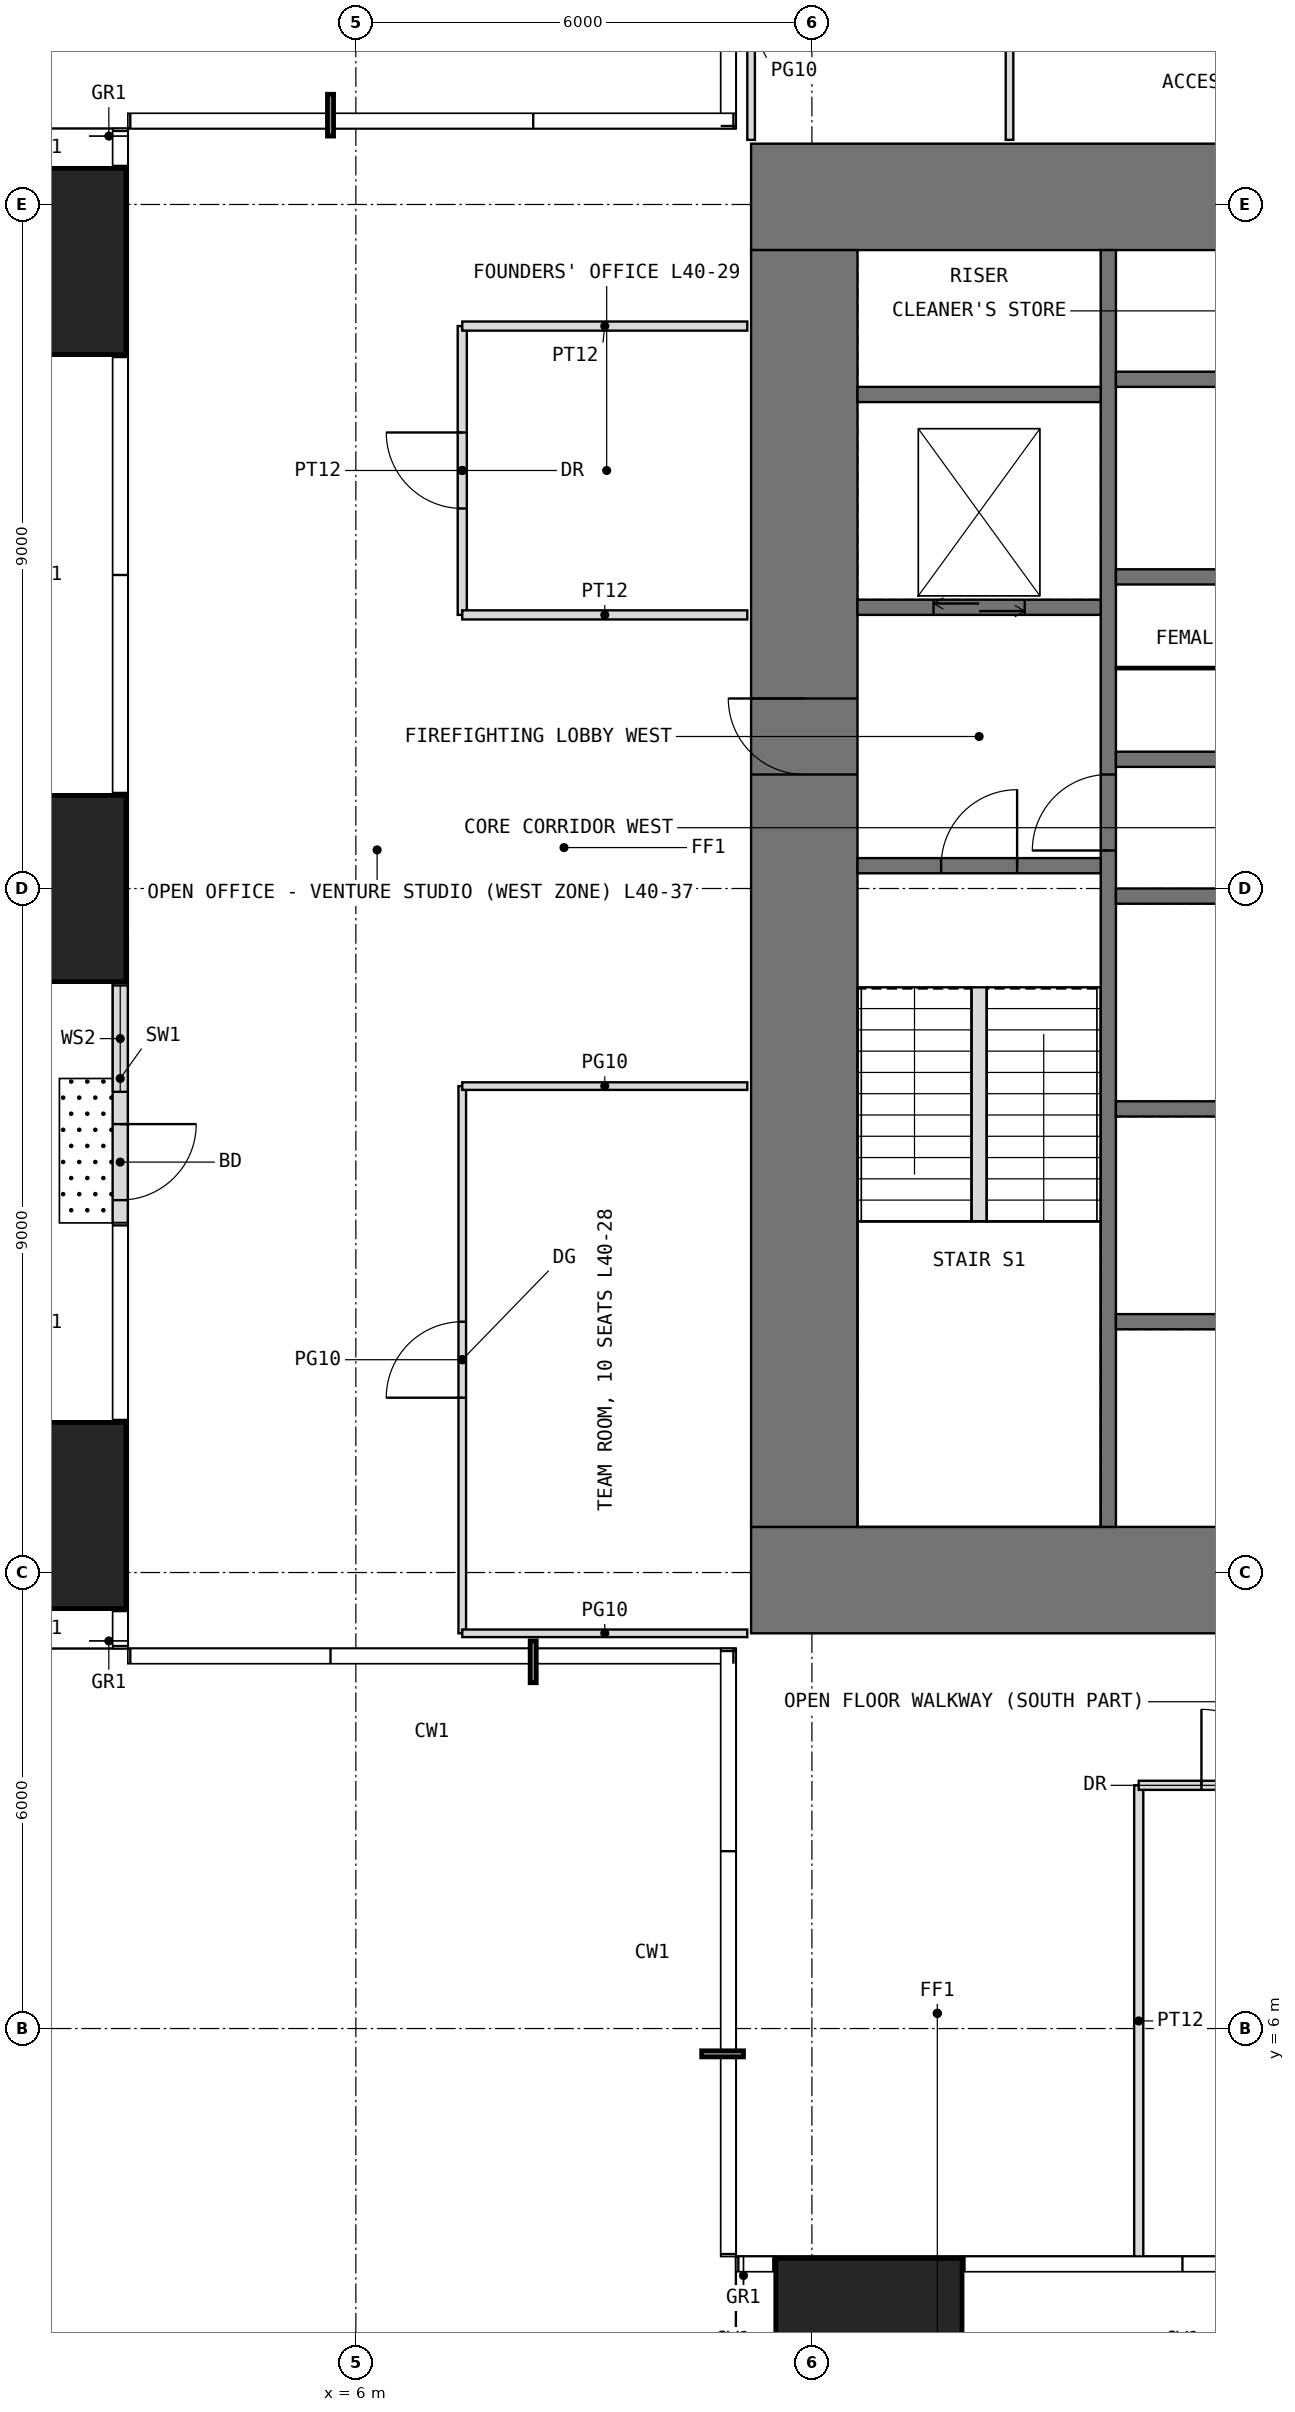
"""IFC4 building model, lengths in metres.
Left out: names, types, materials, properties, quantities, classifications, styles, units other than length and angle.
Written with IfcOpenShell. Run it as: python <this file> out.ifc"""

import sys

from ifc_helpers import new_model, si_unit, direction, frame, frame_2d, origin, origin_2d, place, context, subcontext, project, spatial, rectangle, extrude, element, fill, save


model = new_model("IFC4")
c1 = context("Model", 3, precision=1e-05, world=origin(), true_north=direction((0.0, 1.0)))
c2 = subcontext(c1, "Body", "Model", "MODEL_VIEW")
j1 = project(units=[si_unit("LENGTHUNIT", "METRE"), si_unit("PLANEANGLEUNIT", "RADIAN")], contexts=[c1])
p1 = place(None, origin())
s1 = spatial("IfcSite", under=j1, at=p1, CompositionType="ELEMENT")
p2 = place(p1, origin())
s2 = spatial("IfcBuilding", under=s1, at=p2, CompositionType="ELEMENT")
p3 = place(p2, frame((0.0, 0.0, 170.5)))
s3 = spatial("IfcBuildingStorey", under=s2, at=p3, CompositionType="ELEMENT", Elevation=170.5)
for number, where, z_axis, x_axis in (
    (1, (12.75, 1.75, 0.0), (0.0, 0.0, 1.0), (1.0, 0.0, 0.0)),
    (2, (1.75, 12.75, 0.0), (0.0, 0.0, 1.0), (1.0, 0.0, 0.0)),
    (3, (1.75, 21.0, 0.0), (0.0, 0.0, 1.0), (1.0, 0.0, 0.0)),
    (4, (1.75, 29.25, 0.0), (0.0, 0.0, 1.0), (1.0, 0.0, 0.0)),
):
    element("IfcColumn", number, at=place(p3, frame(where, z_axis=z_axis, x_axis=x_axis)), inside=s3, PredefinedType="COLUMN", context=c2, shape_type="SweptSolid", body=[
        extrude(rectangle(XDim=2.45, YDim=2.45, at=origin_2d()), origin(), (0.0, 0.0, 1.0), 4.0),
    ])
p4 = place(p3, frame((2.9, 20.4, 0.0), z_axis=(0.0, 0.0, 1.0), x_axis=(0.0, -1.0, 0.0)))
e5 = element("IfcWall", 5, at=p4, inside=s3, PredefinedType="USERDEFINED", context=c2, shape_type="SweptSolid", body=[
    extrude(rectangle(XDim=3.8, YDim=0.2, at=frame_2d((1.9, 0.0))), origin(), (0.0, 0.0, 1.0), 3.75),
])
p5 = place(p4, frame((2.5, 0.0, 0.0)))
e6 = element("IfcOpeningElement", 6, at=p5, cuts=e5, PredefinedType="OPENING", context=c2, shape_type="SweptSolid", body=[
    extrude(rectangle(XDim=1.0, YDim=2.4, at=frame_2d((0.5, 1.2))), frame((0.0, 0.11, 0.0), z_axis=(0.0, -1.0, 0.0), x_axis=(1.0, 0.0, 0.0)), (0.0, 0.0, 1.0), 0.22),
])
p6 = place(p4, frame((0.675, 0.0, 0.3)))
e7 = element("IfcOpeningElement", 7, at=p6, cuts=e5, PredefinedType="OPENING", context=c2, shape_type="SweptSolid", body=[
    extrude(rectangle(XDim=1.4, YDim=2.7, at=frame_2d((0.7, 1.35))), frame((0.0, 0.11, 0.0), z_axis=(0.0, -1.0, 0.0), x_axis=(1.0, 0.0, 0.0)), (0.0, 0.0, 1.0), 0.22),
])
p7 = place(p3, frame((11.2, 11.9, -0.05), z_axis=(0.0, 0.0, 1.0), x_axis=(1.0, 0.0, 0.0)))
e8 = element("IfcWall", 8, at=p7, inside=s3, PredefinedType="SHEAR", context=c2, shape_type="SweptSolid", body=[
    extrude(rectangle(XDim=19.6, YDim=1.4, at=frame_2d((9.8, 0.0))), origin(), (0.0, 0.0, 1.0), 4.0),
])
p8 = place(p7, frame((8.8, 0.0, 0.05)))
e9 = element("IfcOpeningElement", 9, at=p8, cuts=e8, PredefinedType="OPENING", context=c2, shape_type="SweptSolid", body=[
    extrude(rectangle(XDim=2.0, YDim=2.2, at=frame_2d((1.0, 1.1))), frame((0.0, 0.71, 0.0), z_axis=(0.0, -1.0, 0.0), x_axis=(1.0, 0.0, 0.0)), (0.0, 0.0, 1.0), 1.42),
])
p9 = place(p3, frame((11.2, 30.1, -0.05), z_axis=(0.0, 0.0, 1.0), x_axis=(1.0, 0.0, 0.0)))
e10 = element("IfcWall", 10, at=p9, inside=s3, PredefinedType="SHEAR", context=c2, shape_type="SweptSolid", body=[
    extrude(rectangle(XDim=19.6, YDim=1.4, at=frame_2d((9.8, 0.0))), origin(), (0.0, 0.0, 1.0), 4.0),
])
p10 = place(p9, frame((8.8, 0.0, 0.05)))
e11 = element("IfcOpeningElement", 11, at=p10, cuts=e10, PredefinedType="OPENING", context=c2, shape_type="SweptSolid", body=[
    extrude(rectangle(XDim=2.0, YDim=2.2, at=frame_2d((1.0, 1.1))), frame((0.0, 0.71, 0.0), z_axis=(0.0, -1.0, 0.0), x_axis=(1.0, 0.0, 0.0)), (0.0, 0.0, 1.0), 1.42),
])
p11 = place(p3, frame((11.9, 12.6, -0.05), z_axis=(0.0, 0.0, 1.0), x_axis=(0.0, 1.0, 0.0)))
e12 = element("IfcWall", 12, at=p11, inside=s3, PredefinedType="SHEAR", context=c2, shape_type="SweptSolid", body=[
    extrude(rectangle(XDim=16.8, YDim=1.4, at=frame_2d((8.4, 0.0))), origin(), (0.0, 0.0, 1.0), 4.0),
])
p12 = place(p11, frame((9.9, 0.0, 0.05)))
e13 = element("IfcOpeningElement", 13, at=p12, cuts=e12, PredefinedType="OPENING", context=c2, shape_type="SweptSolid", body=[
    extrude(rectangle(XDim=1.0, YDim=2.2, at=frame_2d((0.5, 1.1))), frame((0.0, 0.71, 0.0), z_axis=(0.0, -1.0, 0.0), x_axis=(1.0, 0.0, 0.0)), (0.0, 0.0, 1.0), 1.42),
])
p13 = place(p3, frame((15.9, 12.6, -0.05), z_axis=(0.0, 0.0, 1.0), x_axis=(0.0, 1.0, 0.0)))
e14 = element("IfcWall", 14, at=p13, inside=s3, PredefinedType="SHEAR", context=c2, shape_type="SweptSolid", body=[
    extrude(rectangle(XDim=16.8, YDim=0.2, at=frame_2d((8.4, 0.0))), origin(), (0.0, 0.0, 1.0), 4.0),
])
p14 = place(p13, frame((8.9, 0.0, 0.05)))
e15 = element("IfcOpeningElement", 15, at=p14, cuts=e14, PredefinedType="OPENING", context=c2, shape_type="SweptSolid", body=[
    extrude(rectangle(XDim=1.0, YDim=2.2, at=frame_2d((0.5, 1.1))), frame((0.0, 0.11, 0.0), z_axis=(0.0, -1.0, 0.0), x_axis=(1.0, 0.0, 0.0)), (0.0, 0.0, 1.0), 0.22),
])
p15 = place(p3, frame((12.6, 21.3, -0.05), z_axis=(0.0, 0.0, 1.0), x_axis=(1.0, 0.0, 0.0)))
e16 = element("IfcWall", 16, at=p15, inside=s3, PredefinedType="SHEAR", context=c2, shape_type="SweptSolid", body=[
    extrude(rectangle(XDim=3.2, YDim=0.2, at=frame_2d((1.6, 0.0))), origin(), (0.0, 0.0, 1.0), 4.0),
])
p16 = place(p15, frame((1.1, 0.0, 0.05)))
e17 = element("IfcOpeningElement", 17, at=p16, cuts=e16, PredefinedType="OPENING", context=c2, shape_type="SweptSolid", body=[
    extrude(rectangle(XDim=1.0, YDim=2.2, at=frame_2d((0.5, 1.1))), frame((0.0, 0.11, 0.0), z_axis=(0.0, -1.0, 0.0), x_axis=(1.0, 0.0, 0.0)), (0.0, 0.0, 1.0), 0.22),
])
p17 = place(p3, frame((12.6, 24.7, -0.05), z_axis=(0.0, 0.0, 1.0), x_axis=(1.0, 0.0, 0.0)))
e18 = element("IfcWall", 18, at=p17, inside=s3, PredefinedType="SHEAR", context=c2, shape_type="SweptSolid", body=[
    extrude(rectangle(XDim=3.2, YDim=0.2, at=frame_2d((1.6, 0.0))), origin(), (0.0, 0.0, 1.0), 4.0),
])
p18 = place(p17, frame((1.0, 0.0, 0.05)))
e19 = element("IfcOpeningElement", 19, at=p18, cuts=e18, PredefinedType="OPENING", context=c2, shape_type="SweptSolid", body=[
    extrude(rectangle(XDim=1.2, YDim=2.2, at=frame_2d((0.6, 1.1))), frame((0.0, 0.11, 0.0), z_axis=(0.0, -1.0, 0.0), x_axis=(1.0, 0.0, 0.0)), (0.0, 0.0, 1.0), 0.22),
])
for number, where, z_axis, x_axis in (
    (20, (12.6, 27.5, -0.05), (0.0, 0.0, 1.0), (1.0, 0.0, 0.0)),
    (21, (16.0, 15.3, -0.05), (0.0, 0.0, 1.0), (1.0, 0.0, 0.0)),
    (22, (16.0, 18.1, -0.05), (0.0, 0.0, 1.0), (1.0, 0.0, 0.0)),
    (23, (16.0, 20.9, -0.05), (0.0, 0.0, 1.0), (1.0, 0.0, 0.0)),
    (24, (16.0, 22.7, -0.05), (0.0, 0.0, 1.0), (1.0, 0.0, 0.0)),
    (25, (16.0, 25.1, -0.05), (0.0, 0.0, 1.0), (1.0, 0.0, 0.0)),
    (26, (16.0, 27.7, -0.05), (0.0, 0.0, 1.0), (1.0, 0.0, 0.0)),
):
    element("IfcWall", number, at=place(p3, frame(where, z_axis=z_axis, x_axis=x_axis)), inside=s3, PredefinedType="SHEAR", context=c2, shape_type="SweptSolid", body=[
        extrude(rectangle(XDim=3.2, YDim=0.2, at=frame_2d((1.6, 0.0))), origin(), (0.0, 0.0, 1.0), 4.0),
    ])
p19 = place(p3, frame((16.0, 23.9, 0.0), z_axis=(0.0, 0.0, 1.0), x_axis=(1.0, 0.0, 0.0)))
e27 = element("IfcWall", 27, at=p19, inside=s3, PredefinedType="PARTITIONING", context=c2, shape_type="SweptSolid", body=[
    extrude(rectangle(XDim=1.4, YDim=0.03, at=frame_2d((0.7, 0.0))), origin(), (0.0, 0.0, 1.0), 3.75),
])
p20 = place(p3, frame((7.4, 11.2, 0.0), z_axis=(0.0, 0.0, 1.0), x_axis=(0.0, 1.0, 0.0)))
e28 = element("IfcWall", 28, at=p20, inside=s3, PredefinedType="PARTITIONING", context=c2, shape_type="SweptSolid", body=[
    extrude(rectangle(XDim=7.2, YDim=0.1, at=frame_2d((3.6, 0.0))), origin(), (0.0, 0.0, 1.0), 3.75),
])
p21 = place(p20, frame((3.1, 0.0, 0.0)))
e29 = element("IfcOpeningElement", 29, at=p21, cuts=e28, PredefinedType="OPENING", context=c2, shape_type="SweptSolid", body=[
    extrude(rectangle(XDim=1.0, YDim=2.4, at=frame_2d((0.5, 1.2))), frame((0.0, 0.06, 0.0), z_axis=(0.0, -1.0, 0.0), x_axis=(1.0, 0.0, 0.0)), (0.0, 0.0, 1.0), 0.12),
])
for number, where, z_axis, x_axis in (
    (30, (7.4, 11.2, 0.0), (0.0, 0.0, 1.0), (1.0, 0.0, 0.0)),
    (31, (7.4, 18.4, 0.0), (0.0, 0.0, 1.0), (1.0, 0.0, 0.0)),
):
    element("IfcWall", number, at=place(p3, frame(where, z_axis=z_axis, x_axis=x_axis)), inside=s3, PredefinedType="PARTITIONING", context=c2, shape_type="SweptSolid", body=[
        extrude(rectangle(XDim=3.75, YDim=0.1, at=frame_2d((1.875, 0.0))), origin(), (0.0, 0.0, 1.0), 3.75),
    ])
p22 = place(p3, frame((7.4, 24.6, 0.0), z_axis=(0.0, 0.0, 1.0), x_axis=(0.0, 1.0, 0.0)))
e32 = element("IfcWall", 32, at=p22, inside=s3, PredefinedType="PARTITIONING", context=c2, shape_type="SweptSolid", body=[
    extrude(rectangle(XDim=3.8, YDim=0.12, at=frame_2d((1.9, 0.0))), origin(), (0.0, 0.0, 1.0), 3.75),
])
p23 = place(p22, frame((1.4, 0.0, 0.0)))
e33 = element("IfcOpeningElement", 33, at=p23, cuts=e32, PredefinedType="OPENING", context=c2, shape_type="SweptSolid", body=[
    extrude(rectangle(XDim=1.0, YDim=2.2, at=frame_2d((0.5, 1.1))), frame((0.0, 0.07, 0.0), z_axis=(0.0, -1.0, 0.0), x_axis=(1.0, 0.0, 0.0)), (0.0, 0.0, 1.0), 0.14),
])
for number, where, z_axis, x_axis in (
    (34, (7.4, 24.6, 0.0), (0.0, 0.0, 1.0), (1.0, 0.0, 0.0)),
    (35, (7.4, 28.4, 0.0), (0.0, 0.0, 1.0), (1.0, 0.0, 0.0)),
):
    element("IfcWall", number, at=place(p3, frame(where, z_axis=z_axis, x_axis=x_axis)), inside=s3, PredefinedType="PARTITIONING", context=c2, shape_type="SweptSolid", body=[
        extrude(rectangle(XDim=3.75, YDim=0.12, at=frame_2d((1.875, 0.0))), origin(), (0.0, 0.0, 1.0), 3.75),
    ])
for number, where, z_axis, x_axis in (
    (36, (11.2, 30.85, 0.0), (0.0, 0.0, 1.0), (0.0, 1.0, 0.0)),
    (37, (14.6, 30.85, 0.0), (0.0, 0.0, 1.0), (0.0, 1.0, 0.0)),
):
    element("IfcWall", number, at=place(p3, frame(where, z_axis=z_axis, x_axis=x_axis)), inside=s3, PredefinedType="PARTITIONING", context=c2, shape_type="SweptSolid", body=[
        extrude(rectangle(XDim=2.95, YDim=0.1, at=frame_2d((1.475, 0.0))), origin(), (0.0, 0.0, 1.0), 3.75),
    ])
p24 = place(p3, frame((16.3, 3.0, 0.0), z_axis=(0.0, 0.0, 1.0), x_axis=(0.0, 1.0, 0.0)))
e38 = element("IfcWall", 38, at=p24, inside=s3, PredefinedType="PARTITIONING", context=c2, shape_type="SweptSolid", body=[
    extrude(rectangle(XDim=6.2, YDim=0.12, at=frame_2d((3.1, 0.0))), origin(), (0.0, 0.0, 1.0), 3.75),
])
p25 = place(p3, frame((16.3, 9.2, 0.0), z_axis=(0.0, 0.0, 1.0), x_axis=(1.0, 0.0, 0.0)))
e39 = element("IfcWall", 39, at=p25, inside=s3, PredefinedType="PARTITIONING", context=c2, shape_type="SweptSolid", body=[
    extrude(rectangle(XDim=2.65, YDim=0.12, at=frame_2d((1.325, 0.0))), origin(), (0.0, 0.0, 1.0), 3.75),
])
p26 = place(p25, frame((0.825, 0.0, 0.0)))
e40 = element("IfcOpeningElement", 40, at=p26, cuts=e39, PredefinedType="OPENING", context=c2, shape_type="SweptSolid", body=[
    extrude(rectangle(XDim=1.0, YDim=2.2, at=frame_2d((0.5, 1.1))), frame((0.0, 0.07, 0.0), z_axis=(0.0, -1.0, 0.0), x_axis=(1.0, 0.0, 0.0)), (0.0, 0.0, 1.0), 0.14),
])
p27 = place(p3, frame((14.2, 16.62, 0.0), z_axis=(0.0, 0.0, 1.0), x_axis=(0.0, 1.0, 0.0)))
e41 = element("IfcWall", 41, at=p27, inside=s3, PredefinedType="PARTITIONING", context=c2, shape_type="SweptSolid", body=[
    extrude(rectangle(XDim=3.08, YDim=0.2, at=frame_2d((1.54, 0.0))), origin(), (0.0, 0.0, 1.0), 4.0),
])
p28 = place(p5, origin())
e42 = element("IfcDoor", 42, at=p28, inside=s3, OperationType="SINGLE_SWING_LEFT", PredefinedType="DOOR", context=c2, shape_type="SweptSolid", body=[
    extrude(rectangle(XDim=1.0, YDim=2.4, at=frame_2d((0.5, 1.2))), frame((0.0, 0.025, 0.0), z_axis=(0.0, -1.0, 0.0), x_axis=(1.0, 0.0, 0.0)), (0.0, 0.0, 1.0), 0.05),
])
fill(e6, e42)
p29 = place(p6, origin())
e43 = element("IfcWindow", 43, at=p29, inside=s3, PartitioningType="SINGLE_PANEL", PredefinedType="WINDOW", context=c2, shape_type="SweptSolid", body=[
    extrude(rectangle(XDim=1.4, YDim=2.7, at=frame_2d((0.7, 1.35))), frame((0.0, 0.03, 0.0), z_axis=(0.0, -1.0, 0.0), x_axis=(1.0, 0.0, 0.0)), (0.0, 0.0, 1.0), 0.06),
])
fill(e7, e43)
p30 = place(p12, origin())
e44 = element("IfcDoor", 44, at=p30, inside=s3, OperationType="SINGLE_SWING_RIGHT", PredefinedType="DOOR", context=c2, shape_type="SweptSolid", body=[
    extrude(rectangle(XDim=1.0, YDim=2.2, at=frame_2d((0.5, 1.1))), frame((0.0, 0.025, 0.0), z_axis=(0.0, -1.0, 0.0), x_axis=(1.0, 0.0, 0.0)), (0.0, 0.0, 1.0), 0.05),
])
fill(e13, e44)
p31 = place(p16, origin())
e45 = element("IfcDoor", 45, at=p31, inside=s3, OperationType="SINGLE_SWING_RIGHT", PredefinedType="DOOR", context=c2, shape_type="SweptSolid", body=[
    extrude(rectangle(XDim=1.0, YDim=2.2, at=frame_2d((0.5, 1.1))), frame((0.0, 0.025, 0.0), z_axis=(0.0, -1.0, 0.0), x_axis=(1.0, 0.0, 0.0)), (0.0, 0.0, 1.0), 0.05),
])
fill(e17, e45)
p32 = place(p14, origin())
e46 = element("IfcDoor", 46, at=p32, inside=s3, OperationType="SINGLE_SWING_LEFT", PredefinedType="DOOR", context=c2, shape_type="SweptSolid", body=[
    extrude(rectangle(XDim=1.0, YDim=2.2, at=frame_2d((0.5, 1.1))), frame((0.0, 0.025, 0.0), z_axis=(0.0, -1.0, 0.0), x_axis=(1.0, 0.0, 0.0)), (0.0, 0.0, 1.0), 0.05),
])
fill(e15, e46)
p33 = place(p26, origin())
e47 = element("IfcDoor", 47, at=p33, inside=s3, OperationType="SINGLE_SWING_LEFT", PredefinedType="DOOR", context=c2, shape_type="SweptSolid", body=[
    extrude(rectangle(XDim=1.0, YDim=2.2, at=frame_2d((0.5, 1.1))), frame((0.0, 0.025, 0.0), z_axis=(0.0, -1.0, 0.0), x_axis=(1.0, 0.0, 0.0)), (0.0, 0.0, 1.0), 0.05),
])
fill(e40, e47)
p34 = place(p21, origin())
e48 = element("IfcDoor", 48, at=p34, inside=s3, OperationType="SINGLE_SWING_LEFT", PredefinedType="DOOR", context=c2, shape_type="SweptSolid", body=[
    extrude(rectangle(XDim=1.0, YDim=2.4, at=frame_2d((0.5, 1.2))), frame((0.0, 0.025, 0.0), z_axis=(0.0, -1.0, 0.0), x_axis=(1.0, 0.0, 0.0)), (0.0, 0.0, 1.0), 0.05),
])
fill(e29, e48)
p35 = place(p23, origin())
e49 = element("IfcDoor", 49, at=p35, inside=s3, OperationType="SINGLE_SWING_RIGHT", PredefinedType="DOOR", context=c2, shape_type="SweptSolid", body=[
    extrude(rectangle(XDim=1.0, YDim=2.2, at=frame_2d((0.5, 1.1))), frame((0.0, 0.025, 0.0), z_axis=(0.0, -1.0, 0.0), x_axis=(1.0, 0.0, 0.0)), (0.0, 0.0, 1.0), 0.05),
])
fill(e33, e49)
p36 = place(p18, origin())
e50 = element("IfcDoor", 50, at=p36, inside=s3, OperationType="DOUBLE_DOOR_SLIDING", PredefinedType="DOOR", context=c2, shape_type="SweptSolid", body=[
    extrude(rectangle(XDim=1.2, YDim=2.2, at=frame_2d((0.6, 1.1))), frame((0.0, 0.025, 0.0), z_axis=(0.0, -1.0, 0.0), x_axis=(1.0, 0.0, 0.0)), (0.0, 0.0, 1.0), 0.05),
])
fill(e19, e50)
save(model, sys.argv[1])
